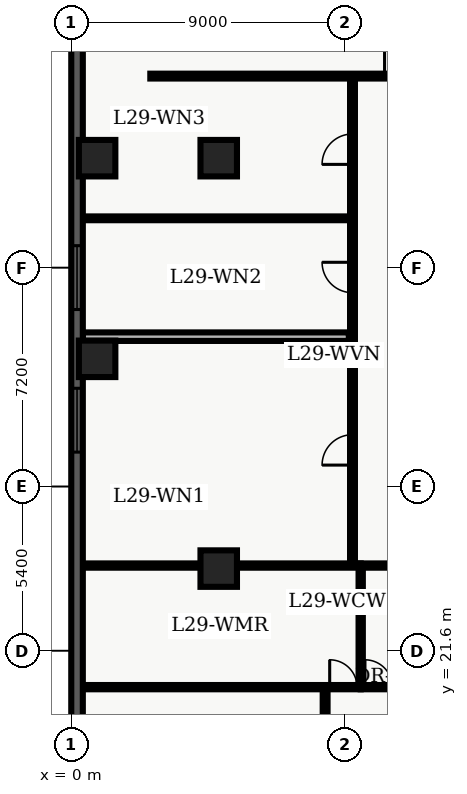
"""IFC4 building model, lengths in metres.
Left out: names, types, materials, properties, quantities, classifications, styles, units other than length and angle.
Written with IfcOpenShell. Run it as: python <this file> out.ifc"""

import sys

from ifc_helpers import new_model, entity, si_unit, converted_unit, direction, frame, origin_with_axes, origin_2d_with_axis, place, context, subcontext, project, spatial, polyline, rectangle, outline, extrude, element, fill, save


model = new_model("IFC4")
c1 = context("Model", 3, precision=1e-05, world=origin_with_axes(), true_north=direction((0.0, 1.0)))
c2 = subcontext(c1, "Body", "Model", "MODEL_VIEW")
j1 = project(units=[si_unit("LENGTHUNIT", "METRE"), converted_unit("PLANEANGLEUNIT", "DEGREE", entity("IfcPlaneAngleMeasure", 0.017), si_unit("PLANEANGLEUNIT", "RADIAN"), dimensions=[0, 0, 0, 0, 0, 0, 0])], contexts=[c1])
p1 = place(None, origin_with_axes())
s1 = spatial("IfcSite", under=j1, at=p1, CompositionType="ELEMENT")
p2 = place(p1, origin_with_axes())
s2 = spatial("IfcBuilding", under=s1, at=p2, CompositionType="ELEMENT")
p3 = place(p2, frame((0.0, 0.0, 120.3), z_axis=(0.0, 0.0, 1.0), x_axis=(1.0, 0.0, 0.0)))
s3 = spatial("IfcBuildingStorey", under=s2, at=p3, CompositionType="ELEMENT", Elevation=120.3)
for number, where, z_axis, x_axis in (
    (1, (4.85, 24.3, 0.0), (0.0, 0.0, 1.0), (1.0, 0.0, 0.0)),
    (2, (4.85, 37.8, 0.0), (0.0, 0.0, 1.0), (1.0, 0.0, 0.0)),
    (3, (0.85, 31.2, 0.0), (0.0, 0.0, 1.0), (1.0, 0.0, 0.0)),
    (4, (0.85, 37.8, 0.0), (0.0, 0.0, 1.0), (1.0, 0.0, 0.0)),
):
    element("IfcColumn", number, at=place(p3, frame(where, z_axis=z_axis, x_axis=x_axis)), inside=s3, PredefinedType="COLUMN", context=c2, shape_type="SweptSolid", body=[
        extrude(rectangle(XDim=1.2, YDim=1.2, at=origin_2d_with_axis()), origin_with_axes(), (0.0, 0.0, 1.0), 3.9),
    ])
p4 = place(p3, frame((9.52, 20.4, 0.0), z_axis=(0.0, 0.0, 1.0), x_axis=(0.0, 1.0, 0.0)))
e5 = element("IfcWall", 5, at=p4, inside=s3, PredefinedType="PARTITIONING", context=c2, shape_type="SweptSolid", body=[
    extrude(outline(polyline([(0.0, -0.07), (4.0, -0.07), (4.0, 0.07), (0.0, 0.07), (0.0, -0.07)])), origin_with_axes(), (0.0, 0.0, 1.0), 2.64),
])
p5 = place(p3, frame((9.52, 20.4, 0.0), z_axis=(0.0, 0.0, 1.0), x_axis=(1.0, 0.0, 0.0)))
e6 = element("IfcWall", 6, at=p5, inside=s3, PredefinedType="PARTITIONING", context=c2, shape_type="SweptSolid", body=[
    extrude(outline(polyline([(0.0, -0.07), (1.58, -0.07), (1.58, 0.07), (0.0, 0.07), (0.0, -0.07)])), origin_with_axes(), (0.0, 0.0, 1.0), 2.64),
])
p6 = place(p5, frame((0.59, 0.0, 0.0), z_axis=(0.0, 0.0, 1.0), x_axis=(1.0, 0.0, 0.0)))
e7 = element("IfcOpeningElement", 7, at=p6, cuts=e6, PredefinedType="OPENING", context=c2, shape_type="SweptSolid", body=[
    extrude(rectangle(XDim=0.9, YDim=0.16, at=origin_2d_with_axis()), origin_with_axes(), (0.0, 0.0, 1.0), 2.15),
])
p7 = place(p3, frame((9.52, 24.4, 0.0), z_axis=(0.0, 0.0, 1.0), x_axis=(1.0, 0.0, 0.0)))
e8 = element("IfcWall", 8, at=p7, inside=s3, PredefinedType="PARTITIONING", context=c2, shape_type="SweptSolid", body=[
    extrude(outline(polyline([(0.0, -0.07), (1.58, -0.07), (1.58, 0.07), (0.0, 0.07), (0.0, -0.07)])), origin_with_axes(), (0.0, 0.0, 1.0), 2.64),
])
p8 = place(p3, frame((2.6, 40.5, 0.0), z_axis=(0.0, 0.0, 1.0), x_axis=(1.0, 0.0, 0.0)))
e9 = element("IfcWall", 9, at=p8, inside=s3, PredefinedType="PARTITIONING", context=c2, shape_type="SweptSolid", body=[
    extrude(outline(polyline([(0.0, -0.08), (18.65, -0.08), (18.65, 0.08), (0.0, 0.08), (0.0, -0.08)])), origin_with_axes(), (0.0, 0.0, 1.0), 2.64),
])
p9 = place(p8, frame((8.205, 0.0, 0.0), z_axis=(0.0, 0.0, 1.0), x_axis=(1.0, 0.0, 0.0)))
e10 = element("IfcOpeningElement", 10, at=p9, cuts=e9, PredefinedType="OPENING", context=c2, shape_type="SweptSolid", body=[
    extrude(rectangle(XDim=1.0, YDim=0.18, at=origin_2d_with_axis()), origin_with_axes(), (0.0, 0.0, 1.0), 2.15),
])
p10 = place(p3, frame((8.35, 7.8, 0.0), z_axis=(0.0, 0.0, 1.0), x_axis=(0.0, 1.0, 0.0)))
e11 = element("IfcWall", 11, at=p10, inside=s3, PredefinedType="PARTITIONING", context=c2, shape_type="SweptSolid", body=[
    extrude(outline(polyline([(0.0, -0.08), (12.6, -0.08), (12.6, 0.08), (0.0, 0.08), (0.0, -0.08)])), origin_with_axes(), (0.0, 0.0, 1.0), 2.64),
])
p11 = place(p10, frame((2.914, 0.0, 0.0), z_axis=(0.0, 0.0, 1.0), x_axis=(1.0, 0.0, 0.0)))
e12 = element("IfcOpeningElement", 12, at=p11, cuts=e11, PredefinedType="OPENING", context=c2, shape_type="SweptSolid", body=[
    extrude(rectangle(XDim=1.0, YDim=0.18, at=origin_2d_with_axis()), origin_with_axes(), (0.0, 0.0, 1.0), 2.15),
])
p12 = place(p10, frame((9.11, 0.0, 0.0), z_axis=(0.0, 0.0, 1.0), x_axis=(1.0, 0.0, 0.0)))
e13 = element("IfcOpeningElement", 13, at=p12, cuts=e11, PredefinedType="OPENING", context=c2, shape_type="SweptSolid", body=[
    extrude(rectangle(XDim=1.0, YDim=0.18, at=origin_2d_with_axis()), origin_with_axes(), (0.0, 0.0, 1.0), 2.15),
])
p13 = place(p3, frame((9.25, 24.4, 0.0), z_axis=(0.0, 0.0, 1.0), x_axis=(0.0, 1.0, 0.0)))
e14 = element("IfcWall", 14, at=p13, inside=s3, PredefinedType="PARTITIONING", context=c2, shape_type="SweptSolid", body=[
    extrude(outline(polyline([(0.0, -0.08), (16.1, -0.08), (16.1, 0.08), (0.0, 0.08), (0.0, -0.08)])), origin_with_axes(), (0.0, 0.0, 1.0), 2.64),
])
p14 = place(p13, frame((3.804, 0.0, 0.0), z_axis=(0.0, 0.0, 1.0), x_axis=(1.0, 0.0, 0.0)))
e15 = element("IfcOpeningElement", 15, at=p14, cuts=e14, PredefinedType="OPENING", context=c2, shape_type="SweptSolid", body=[
    extrude(rectangle(XDim=1.0, YDim=0.18, at=origin_2d_with_axis()), origin_with_axes(), (0.0, 0.0, 1.0), 2.15),
])
p15 = place(p13, frame((9.476, 0.0, 0.0), z_axis=(0.0, 0.0, 1.0), x_axis=(1.0, 0.0, 0.0)))
e16 = element("IfcOpeningElement", 16, at=p15, cuts=e14, PredefinedType="OPENING", context=c2, shape_type="SweptSolid", body=[
    extrude(rectangle(XDim=1.0, YDim=0.18, at=origin_2d_with_axis()), origin_with_axes(), (0.0, 0.0, 1.0), 2.15),
])
p16 = place(p13, frame((13.696, 0.0, 0.0), z_axis=(0.0, 0.0, 1.0), x_axis=(1.0, 0.0, 0.0)))
e17 = element("IfcOpeningElement", 17, at=p16, cuts=e14, PredefinedType="OPENING", context=c2, shape_type="SweptSolid", body=[
    extrude(rectangle(XDim=1.0, YDim=0.18, at=origin_2d_with_axis()), origin_with_axes(), (0.0, 0.0, 1.0), 2.15),
])
p17 = place(p3, frame((0.36, 20.4, 0.0), z_axis=(0.0, 0.0, 1.0), x_axis=(1.0, 0.0, 0.0)))
e18 = element("IfcWall", 18, at=p17, inside=s3, PredefinedType="PARTITIONING", context=c2, shape_type="SweptSolid", body=[
    extrude(outline(polyline([(0.0, -0.07), (9.16, -0.07), (9.16, 0.07), (0.0, 0.07), (0.0, -0.07)])), origin_with_axes(), (0.0, 0.0, 1.0), 2.64),
])
p18 = place(p17, frame((8.59, 0.0, 0.0), z_axis=(0.0, 0.0, 1.0), x_axis=(1.0, 0.0, 0.0)))
e19 = element("IfcOpeningElement", 19, at=p18, cuts=e18, PredefinedType="OPENING", context=c2, shape_type="SweptSolid", body=[
    extrude(rectangle(XDim=0.9, YDim=0.16, at=origin_2d_with_axis()), origin_with_axes(), (0.0, 0.0, 1.0), 2.15),
])
p19 = place(p3, frame((0.36, 24.4, 0.0), z_axis=(0.0, 0.0, 1.0), x_axis=(1.0, 0.0, 0.0)))
e20 = element("IfcWall", 20, at=p19, inside=s3, PredefinedType="PARTITIONING", context=c2, shape_type="SweptSolid", body=[
    extrude(outline(polyline([(0.0, -0.07), (9.16, -0.07), (9.16, 0.07), (0.0, 0.07), (0.0, -0.07)])), origin_with_axes(), (0.0, 0.0, 1.0), 2.64),
])
p20 = place(p3, frame((0.375, 31.929, 0.0), z_axis=(0.0, 0.0, 1.0), x_axis=(1.0, 0.0, 0.0)))
e21 = element("IfcWall", 21, at=p20, inside=s3, PredefinedType="PARTITIONING", context=c2, shape_type="SweptSolid", body=[
    extrude(outline(polyline([(0.0, -0.14), (8.755, -0.14), (8.755, 0.14), (0.0, 0.14), (0.0, -0.14)])), origin_with_axes(), (0.0, 0.0, 1.0), 2.64),
])
p21 = place(p3, frame((0.375, 35.822, 0.0), z_axis=(0.0, 0.0, 1.0), x_axis=(1.0, 0.0, 0.0)))
e22 = element("IfcWall", 22, at=p21, inside=s3, PredefinedType="PARTITIONING", context=c2, shape_type="SweptSolid", body=[
    extrude(outline(polyline([(0.0, -0.062), (8.755, -0.062), (8.755, 0.062), (0.0, 0.062), (0.0, -0.062)])), origin_with_axes(), (0.0, 0.0, 1.0), 2.64),
])
p22 = place(p3, frame((0.19, 2.78, 0.0), z_axis=(0.0, 0.0, 1.0), x_axis=(0.0, 1.0, 0.0)))
e23 = element("IfcWall", 23, at=p22, inside=s3, PredefinedType="SOLIDWALL", context=c2, shape_type="SweptSolid", body=[
    extrude(outline(polyline([(0.0, -0.19), (43.42, -0.19), (43.42, 0.19), (0.0, 0.19), (0.0, -0.19)])), origin_with_axes(), (0.0, 0.0, 1.0), 3.6),
])
p23 = place(p22, frame((2.946, 0.0, 0.45), z_axis=(0.0, 0.0, 1.0), x_axis=(1.0, 0.0, 0.0)))
e24 = element("IfcOpeningElement", 24, at=p23, cuts=e23, PredefinedType="OPENING", context=c2, shape_type="SweptSolid", body=[
    extrude(rectangle(XDim=2.1, YDim=0.4, at=origin_2d_with_axis()), origin_with_axes(), (0.0, 0.0, 1.0), 2.2),
])
p24 = place(p22, frame((12.328, 0.0, 0.45), z_axis=(0.0, 0.0, 1.0), x_axis=(1.0, 0.0, 0.0)))
e25 = element("IfcOpeningElement", 25, at=p24, cuts=e23, PredefinedType="OPENING", context=c2, shape_type="SweptSolid", body=[
    extrude(rectangle(XDim=2.1, YDim=0.4, at=origin_2d_with_axis()), origin_with_axes(), (0.0, 0.0, 1.0), 2.2),
])
p25 = place(p22, frame((26.401, 0.0, 0.45), z_axis=(0.0, 0.0, 1.0), x_axis=(1.0, 0.0, 0.0)))
e26 = element("IfcOpeningElement", 26, at=p25, cuts=e23, PredefinedType="OPENING", context=c2, shape_type="SweptSolid", body=[
    extrude(rectangle(XDim=2.1, YDim=0.4, at=origin_2d_with_axis()), origin_with_axes(), (0.0, 0.0, 1.0), 2.2),
])
p26 = place(p22, frame((31.092, 0.0, 0.45), z_axis=(0.0, 0.0, 1.0), x_axis=(1.0, 0.0, 0.0)))
e27 = element("IfcOpeningElement", 27, at=p26, cuts=e23, PredefinedType="OPENING", context=c2, shape_type="SweptSolid", body=[
    extrude(rectangle(XDim=2.1, YDim=0.4, at=origin_2d_with_axis()), origin_with_axes(), (0.0, 0.0, 1.0), 2.2),
])
p27 = place(p22, frame((40.024, 0.0, 0.45), z_axis=(0.0, 0.0, 1.0), x_axis=(1.0, 0.0, 0.0)))
e28 = element("IfcOpeningElement", 28, at=p27, cuts=e23, PredefinedType="OPENING", context=c2, shape_type="SweptSolid", body=[
    extrude(rectangle(XDim=2.1, YDim=0.4, at=origin_2d_with_axis()), origin_with_axes(), (0.0, 0.0, 1.0), 2.2),
])
p28 = place(p5, frame((0.59, 0.0, 0.0), z_axis=(0.0, 0.0, 1.0), x_axis=(1.0, 0.0, 0.0)))
e29 = element("IfcDoor", 29, at=p28, inside=s3, OperationType="SINGLE_SWING_LEFT", PredefinedType="DOOR", context=c2, shape_type="SweptSolid", body=[
    extrude(rectangle(XDim=0.9, YDim=0.084, at=origin_2d_with_axis()), origin_with_axes(), (0.0, 0.0, 1.0), 2.15),
])
fill(e7, e29)
p29 = place(p17, frame((8.59, 0.0, 0.0), z_axis=(0.0, 0.0, 1.0), x_axis=(1.0, 0.0, 0.0)))
e30 = element("IfcDoor", 30, at=p29, inside=s3, OperationType="SINGLE_SWING_LEFT", PredefinedType="DOOR", context=c2, shape_type="SweptSolid", body=[
    extrude(rectangle(XDim=0.9, YDim=0.084, at=origin_2d_with_axis()), origin_with_axes(), (0.0, 0.0, 1.0), 2.15),
])
fill(e19, e30)
p30 = place(p13, frame((3.804, 0.0, 0.0), z_axis=(0.0, 0.0, 1.0), x_axis=(1.0, 0.0, 0.0)))
e31 = element("IfcDoor", 31, at=p30, inside=s3, OperationType="SINGLE_SWING_LEFT", PredefinedType="DOOR", context=c2, shape_type="SweptSolid", body=[
    extrude(rectangle(XDim=1.0, YDim=0.09, at=origin_2d_with_axis()), origin_with_axes(), (0.0, 0.0, 1.0), 2.15),
])
fill(e15, e31)
p31 = place(p13, frame((9.476, 0.0, 0.0), z_axis=(0.0, 0.0, 1.0), x_axis=(1.0, 0.0, 0.0)))
e32 = element("IfcDoor", 32, at=p31, inside=s3, OperationType="SINGLE_SWING_RIGHT", PredefinedType="DOOR", context=c2, shape_type="SweptSolid", body=[
    extrude(rectangle(XDim=1.0, YDim=0.09, at=origin_2d_with_axis()), origin_with_axes(), (0.0, 0.0, 1.0), 2.15),
])
fill(e16, e32)
p32 = place(p13, frame((13.696, 0.0, 0.0), z_axis=(0.0, 0.0, 1.0), x_axis=(1.0, 0.0, 0.0)))
e33 = element("IfcDoor", 33, at=p32, inside=s3, OperationType="SINGLE_SWING_LEFT", PredefinedType="DOOR", context=c2, shape_type="SweptSolid", body=[
    extrude(rectangle(XDim=1.0, YDim=0.09, at=origin_2d_with_axis()), origin_with_axes(), (0.0, 0.0, 1.0), 2.15),
])
fill(e17, e33)
p33 = place(p8, frame((8.205, 0.0, 0.0), z_axis=(0.0, 0.0, 1.0), x_axis=(1.0, 0.0, 0.0)))
e34 = element("IfcDoor", 34, at=p33, inside=s3, OperationType="SINGLE_SWING_LEFT", PredefinedType="DOOR", context=c2, shape_type="SweptSolid", body=[
    extrude(rectangle(XDim=1.0, YDim=0.09, at=origin_2d_with_axis()), origin_with_axes(), (0.0, 0.0, 1.0), 2.15),
])
fill(e10, e34)
p34 = place(p22, frame((26.401, 0.0, 0.45), z_axis=(0.0, 0.0, 1.0), x_axis=(1.0, 0.0, 0.0)))
e35 = element("IfcWindow", 35, at=p34, inside=s3, PredefinedType="WINDOW", context=c2, shape_type="SweptSolid", body=[
    extrude(rectangle(XDim=2.1, YDim=0.09, at=origin_2d_with_axis()), origin_with_axes(), (0.0, 0.0, 1.0), 2.2),
])
fill(e26, e35)
p35 = place(p22, frame((31.092, 0.0, 0.45), z_axis=(0.0, 0.0, 1.0), x_axis=(1.0, 0.0, 0.0)))
e36 = element("IfcWindow", 36, at=p35, inside=s3, PredefinedType="WINDOW", context=c2, shape_type="SweptSolid", body=[
    extrude(rectangle(XDim=2.1, YDim=0.09, at=origin_2d_with_axis()), origin_with_axes(), (0.0, 0.0, 1.0), 2.2),
])
fill(e27, e36)
save(model, sys.argv[1])
